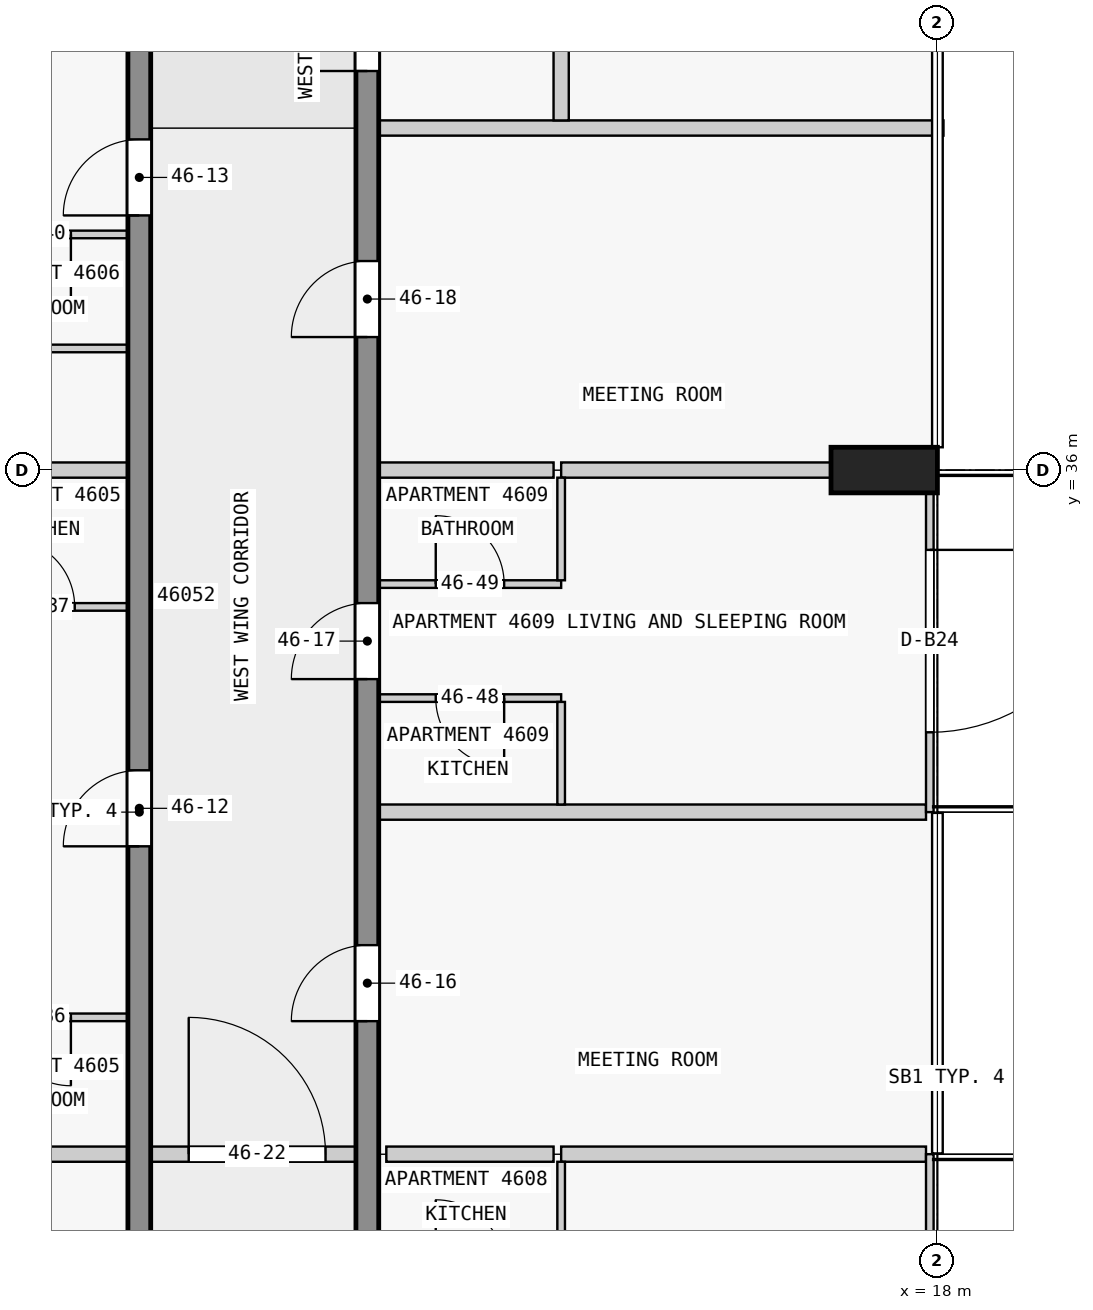
"""IFC4 building model, lengths in metres.
Left out: names, types, materials, properties, quantities, classifications, styles, units other than length and angle.
Written with IfcOpenShell. Run it as: python <this file> out.ifc"""

import sys

from ifc_helpers import new_model, si_unit, direction, frame, frame_2d, origin, origin_2d, place, context, subcontext, project, spatial, rectangle, extrude, element, fill, save


model = new_model("IFC4")
c1 = context("Model", 3, precision=1e-05, world=origin(), true_north=direction((0.0, 1.0)))
c2 = subcontext(c1, "Body", "Model", "MODEL_VIEW")
j1 = project(units=[si_unit("LENGTHUNIT", "METRE"), si_unit("PLANEANGLEUNIT", "RADIAN")], contexts=[c1])
p1 = place(None, origin())
s1 = spatial("IfcSite", under=j1, at=p1, CompositionType="ELEMENT")
p2 = place(p1, origin())
s2 = spatial("IfcBuilding", under=s1, at=p2, CompositionType="ELEMENT")
p3 = place(p2, frame((0.0, 0.0, 177.9)))
s3 = spatial("IfcBuildingStorey", under=s2, at=p3, CompositionType="ELEMENT", Elevation=177.9)
p4 = place(p3, frame((17.3, 36.0, 0.0), z_axis=(0.0, 0.0, 1.0), x_axis=(0.0, 1.0, 0.0)))
e1 = element("IfcColumn", 1, at=p4, inside=s3, PredefinedType="COLUMN", context=c2, shape_type="SweptSolid", body=[
    extrude(rectangle(XDim=0.6, YDim=1.4, at=origin_2d()), origin(), (0.0, 0.0, 1.0), 3.5),
])
p5 = place(p3, frame((7.5, 18.0, 0.0), z_axis=(0.0, 0.0, 1.0), x_axis=(0.0, 1.0, 0.0)))
e2 = element("IfcWall", 2, at=p5, inside=s3, PredefinedType="SHEAR", context=c2, shape_type="SweptSolid", body=[
    extrude(rectangle(XDim=27.0, YDim=0.3, at=frame_2d((13.5, 0.0))), origin(), (0.0, 0.0, 1.0), 3.25),
])
p6 = place(p5, frame((1.75, 0.0, 0.0)))
e3 = element("IfcOpeningElement", 3, at=p6, cuts=e2, PredefinedType="OPENING", context=c2, shape_type="SweptSolid", body=[
    extrude(rectangle(XDim=1.0, YDim=2.1, at=frame_2d((0.5, 1.05))), frame((0.0, 0.16, 0.0), z_axis=(0.0, -1.0, 0.0), x_axis=(1.0, 0.0, 0.0)), (0.0, 0.0, 1.0), 0.32),
])
p7 = place(p5, frame((5.85, 0.0, 0.0)))
e4 = element("IfcOpeningElement", 4, at=p7, cuts=e2, PredefinedType="OPENING", context=c2, shape_type="SweptSolid", body=[
    extrude(rectangle(XDim=1.8, YDim=2.1, at=frame_2d((0.9, 1.05))), frame((0.0, 0.16, 0.0), z_axis=(0.0, -1.0, 0.0), x_axis=(1.0, 0.0, 0.0)), (0.0, 0.0, 1.0), 0.32),
])
p8 = place(p5, frame((13.05, 0.0, 0.0)))
e5 = element("IfcOpeningElement", 5, at=p8, cuts=e2, PredefinedType="OPENING", context=c2, shape_type="SweptSolid", body=[
    extrude(rectangle(XDim=1.0, YDim=2.1, at=frame_2d((0.5, 1.05))), frame((0.0, 0.16, 0.0), z_axis=(0.0, -1.0, 0.0), x_axis=(1.0, 0.0, 0.0)), (0.0, 0.0, 1.0), 0.32),
])
p9 = place(p5, frame((21.35, 0.0, 0.0)))
e6 = element("IfcOpeningElement", 6, at=p9, cuts=e2, PredefinedType="OPENING", context=c2, shape_type="SweptSolid", body=[
    extrude(rectangle(XDim=1.0, YDim=2.1, at=frame_2d((0.5, 1.05))), frame((0.0, 0.16, 0.0), z_axis=(0.0, -1.0, 0.0), x_axis=(1.0, 0.0, 0.0)), (0.0, 0.0, 1.0), 0.32),
])
p10 = place(p3, frame((10.5, 18.0, 0.0), z_axis=(0.0, 0.0, 1.0), x_axis=(0.0, 1.0, 0.0)))
e7 = element("IfcWall", 7, at=p10, inside=s3, PredefinedType="SHEAR", context=c2, shape_type="SweptSolid", body=[
    extrude(rectangle(XDim=27.0, YDim=0.3, at=frame_2d((13.5, 0.0))), origin(), (0.0, 0.0, 1.0), 3.25),
])
p11 = place(p10, frame((1.75, 0.0, 0.0)))
e8 = element("IfcOpeningElement", 8, at=p11, cuts=e7, PredefinedType="OPENING", context=c2, shape_type="SweptSolid", body=[
    extrude(rectangle(XDim=1.0, YDim=2.1, at=frame_2d((0.5, 1.05))), frame((0.0, 0.16, 0.0), z_axis=(0.0, -1.0, 0.0), x_axis=(1.0, 0.0, 0.0)), (0.0, 0.0, 1.0), 0.32),
])
p12 = place(p10, frame((6.25, 0.0, 0.0)))
e9 = element("IfcOpeningElement", 9, at=p12, cuts=e7, PredefinedType="OPENING", context=c2, shape_type="SweptSolid", body=[
    extrude(rectangle(XDim=1.0, YDim=2.1, at=frame_2d((0.5, 1.05))), frame((0.0, 0.16, 0.0), z_axis=(0.0, -1.0, 0.0), x_axis=(1.0, 0.0, 0.0)), (0.0, 0.0, 1.0), 0.32),
])
p13 = place(p10, frame((10.75, 0.0, 0.0)))
e10 = element("IfcOpeningElement", 10, at=p13, cuts=e7, PredefinedType="OPENING", context=c2, shape_type="SweptSolid", body=[
    extrude(rectangle(XDim=1.0, YDim=2.1, at=frame_2d((0.5, 1.05))), frame((0.0, 0.16, 0.0), z_axis=(0.0, -1.0, 0.0), x_axis=(1.0, 0.0, 0.0)), (0.0, 0.0, 1.0), 0.32),
])
p14 = place(p10, frame((15.25, 0.0, 0.0)))
e11 = element("IfcOpeningElement", 11, at=p14, cuts=e7, PredefinedType="OPENING", context=c2, shape_type="SweptSolid", body=[
    extrude(rectangle(XDim=1.0, YDim=2.1, at=frame_2d((0.5, 1.05))), frame((0.0, 0.16, 0.0), z_axis=(0.0, -1.0, 0.0), x_axis=(1.0, 0.0, 0.0)), (0.0, 0.0, 1.0), 0.32),
])
p15 = place(p10, frame((19.75, 0.0, 0.0)))
e12 = element("IfcOpeningElement", 12, at=p15, cuts=e7, PredefinedType="OPENING", context=c2, shape_type="SweptSolid", body=[
    extrude(rectangle(XDim=1.0, YDim=2.1, at=frame_2d((0.5, 1.05))), frame((0.0, 0.16, 0.0), z_axis=(0.0, -1.0, 0.0), x_axis=(1.0, 0.0, 0.0)), (0.0, 0.0, 1.0), 0.32),
])
p16 = place(p10, frame((23.25, 0.0, 0.0)))
e13 = element("IfcOpeningElement", 13, at=p16, cuts=e7, PredefinedType="OPENING", context=c2, shape_type="SweptSolid", body=[
    extrude(rectangle(XDim=0.9, YDim=2.1, at=frame_2d((0.45, 1.05))), frame((0.0, 0.16, 0.0), z_axis=(0.0, -1.0, 0.0), x_axis=(1.0, 0.0, 0.0)), (0.0, 0.0, 1.0), 0.32),
])
p17 = place(p10, frame((25.45, 0.0, 0.0)))
e14 = element("IfcOpeningElement", 14, at=p17, cuts=e7, PredefinedType="OPENING", context=c2, shape_type="SweptSolid", body=[
    extrude(rectangle(XDim=1.0, YDim=2.1, at=frame_2d((0.5, 1.05))), frame((0.0, 0.16, 0.0), z_axis=(0.0, -1.0, 0.0), x_axis=(1.0, 0.0, 0.0)), (0.0, 0.0, 1.0), 0.32),
])
p18 = place(p3, frame((17.9, 27.0, 0.0), z_axis=(0.0, 0.0, 1.0), x_axis=(0.0, -1.0, 0.0)))
e15 = element("IfcWall", 15, at=p18, inside=s3, PredefinedType="STANDARD", context=c2, shape_type="SweptSolid", body=[
    extrude(rectangle(XDim=4.5, YDim=0.1, at=frame_2d((2.25, 0.0))), origin(), (0.0, 0.0, 1.0), 3.25),
])
p19 = place(p18, frame((1.05, 0.0, 0.0)))
e16 = element("IfcOpeningElement", 16, at=p19, cuts=e15, PredefinedType="OPENING", context=c2, shape_type="SweptSolid", body=[
    extrude(rectangle(XDim=2.4, YDim=2.4, at=frame_2d((1.2, 1.2))), frame((0.0, 0.06, 0.0), z_axis=(0.0, -1.0, 0.0), x_axis=(1.0, 0.0, 0.0)), (0.0, 0.0, 1.0), 0.12),
])
p20 = place(p3, frame((17.9, 36.0, 0.0), z_axis=(0.0, 0.0, 1.0), x_axis=(0.0, -1.0, 0.0)))
e17 = element("IfcWall", 17, at=p20, inside=s3, PredefinedType="STANDARD", context=c2, shape_type="SweptSolid", body=[
    extrude(rectangle(XDim=4.5, YDim=0.1, at=frame_2d((2.25, 0.0))), origin(), (0.0, 0.0, 1.0), 3.25),
])
p21 = place(p20, frame((1.05, 0.0, 0.0)))
e18 = element("IfcOpeningElement", 18, at=p21, cuts=e17, PredefinedType="OPENING", context=c2, shape_type="SweptSolid", body=[
    extrude(rectangle(XDim=2.4, YDim=2.4, at=frame_2d((1.2, 1.2))), frame((0.0, 0.06, 0.0), z_axis=(0.0, -1.0, 0.0), x_axis=(1.0, 0.0, 0.0)), (0.0, 0.0, 1.0), 0.12),
])
p22 = place(p3, frame((7.35, 27.0, 0.0), z_axis=(0.0, 0.0, 1.0), x_axis=(-1.0, 0.0, 0.0)))
e19 = element("IfcWall", 19, at=p22, inside=s3, PredefinedType="PARTITIONING", context=c2, shape_type="SweptSolid", body=[
    extrude(rectangle(XDim=7.43, YDim=0.2, at=frame_2d((3.715, 0.0))), origin(), (0.0, 0.0, 1.0), 3.25),
])
p23 = place(p3, frame((12.95, 27.0, 0.0), z_axis=(0.0, 0.0, 1.0), x_axis=(-1.0, 0.0, 0.0)))
e20 = element("IfcWall", 20, at=p23, inside=s3, PredefinedType="PARTITIONING", context=c2, shape_type="SweptSolid", body=[
    extrude(rectangle(XDim=2.2, YDim=0.2, at=frame_2d((1.1, 0.0))), origin(), (0.0, 0.0, 1.0), 3.25),
])
p24 = place(p3, frame((13.05, 27.0, 0.0), z_axis=(0.0, 0.0, 1.0), x_axis=(1.0, 0.0, 0.0)))
e21 = element("IfcWall", 21, at=p24, inside=s3, PredefinedType="PARTITIONING", context=c2, shape_type="SweptSolid", body=[
    extrude(rectangle(XDim=4.8, YDim=0.2, at=frame_2d((2.4, 0.0))), origin(), (0.0, 0.0, 1.0), 3.25),
])
p25 = place(p3, frame((7.35, 28.8, 0.0), z_axis=(0.0, 0.0, 1.0), x_axis=(-1.0, 0.0, 0.0)))
e22 = element("IfcWall", 22, at=p25, inside=s3, PredefinedType="PARTITIONING", context=c2, shape_type="SweptSolid", body=[
    extrude(rectangle(XDim=2.35, YDim=0.1, at=frame_2d((1.175, 0.0))), origin(), (0.0, 0.0, 1.0), 3.25),
])
p26 = place(p25, frame((0.75, 0.0, 0.0)))
e23 = element("IfcOpeningElement", 23, at=p26, cuts=e22, PredefinedType="OPENING", context=c2, shape_type="SweptSolid", body=[
    extrude(rectangle(XDim=0.9, YDim=2.1, at=frame_2d((0.45, 1.05))), frame((0.0, 0.06, 0.0), z_axis=(0.0, -1.0, 0.0), x_axis=(1.0, 0.0, 0.0)), (0.0, 0.0, 1.0), 0.12),
])
p27 = place(p3, frame((17.85, 31.5, 0.0), z_axis=(0.0, 0.0, 1.0), x_axis=(-1.0, 0.0, 0.0)))
e24 = element("IfcWall", 24, at=p27, inside=s3, PredefinedType="PARTITIONING", context=c2, shape_type="SweptSolid", body=[
    extrude(rectangle(XDim=7.2, YDim=0.2, at=frame_2d((3.6, 0.0))), origin(), (0.0, 0.0, 1.0), 3.25),
])
p28 = place(p3, frame((13.05, 33.0, 0.0), z_axis=(0.0, 0.0, 1.0), x_axis=(-1.0, 0.0, 0.0)))
e25 = element("IfcWall", 25, at=p28, inside=s3, PredefinedType="PARTITIONING", context=c2, shape_type="SweptSolid", body=[
    extrude(rectangle(XDim=2.4, YDim=0.1, at=frame_2d((1.2, 0.0))), origin(), (0.0, 0.0, 1.0), 3.25),
])
p29 = place(p28, frame((0.75, 0.0, 0.0)))
e26 = element("IfcOpeningElement", 26, at=p29, cuts=e25, PredefinedType="OPENING", context=c2, shape_type="SweptSolid", body=[
    extrude(rectangle(XDim=0.9, YDim=2.1, at=frame_2d((0.45, 1.05))), frame((0.0, 0.06, 0.0), z_axis=(0.0, -1.0, 0.0), x_axis=(1.0, 0.0, 0.0)), (0.0, 0.0, 1.0), 0.12),
])
p30 = place(p3, frame((5.0, 34.2, 0.0), z_axis=(0.0, 0.0, 1.0), x_axis=(1.0, 0.0, 0.0)))
e27 = element("IfcWall", 27, at=p30, inside=s3, PredefinedType="PARTITIONING", context=c2, shape_type="SweptSolid", body=[
    extrude(rectangle(XDim=2.35, YDim=0.1, at=frame_2d((1.175, 0.0))), origin(), (0.0, 0.0, 1.0), 3.25),
])
p31 = place(p30, frame((0.75, 0.0, 0.0)))
e28 = element("IfcOpeningElement", 28, at=p31, cuts=e27, PredefinedType="OPENING", context=c2, shape_type="SweptSolid", body=[
    extrude(rectangle(XDim=0.9, YDim=2.1, at=frame_2d((0.45, 1.05))), frame((0.0, 0.06, 0.0), z_axis=(0.0, -1.0, 0.0), x_axis=(1.0, 0.0, 0.0)), (0.0, 0.0, 1.0), 0.12),
])
p32 = place(p3, frame((10.65, 34.5, 0.0), z_axis=(0.0, 0.0, 1.0), x_axis=(1.0, 0.0, 0.0)))
e29 = element("IfcWall", 29, at=p32, inside=s3, PredefinedType="PARTITIONING", context=c2, shape_type="SweptSolid", body=[
    extrude(rectangle(XDim=2.4, YDim=0.1, at=frame_2d((1.2, 0.0))), origin(), (0.0, 0.0, 1.0), 3.25),
])
p33 = place(p32, frame((0.75, 0.0, 0.0)))
e30 = element("IfcOpeningElement", 30, at=p33, cuts=e29, PredefinedType="OPENING", context=c2, shape_type="SweptSolid", body=[
    extrude(rectangle(XDim=0.9, YDim=2.1, at=frame_2d((0.45, 1.05))), frame((0.0, 0.06, 0.0), z_axis=(0.0, -1.0, 0.0), x_axis=(1.0, 0.0, 0.0)), (0.0, 0.0, 1.0), 0.12),
])
for number, where, z_axis, x_axis in (
    (31, (7.35, 36.0, 0.0), (0.0, 0.0, 1.0), (-1.0, 0.0, 0.0)),
    (32, (12.95, 36.0, 0.0), (0.0, 0.0, 1.0), (-1.0, 0.0, 0.0)),
):
    element("IfcWall", number, at=place(p3, frame(where, z_axis=z_axis, x_axis=x_axis)), inside=s3, PredefinedType="PARTITIONING", context=c2, shape_type="SweptSolid", body=[
        extrude(rectangle(XDim=2.3, YDim=0.2, at=frame_2d((1.15, 0.0))), origin(), (0.0, 0.0, 1.0), 3.25),
    ])
p34 = place(p3, frame((13.05, 36.0, 0.0), z_axis=(0.0, 0.0, 1.0), x_axis=(1.0, 0.0, 0.0)))
e33 = element("IfcWall", 33, at=p34, inside=s3, PredefinedType="PARTITIONING", context=c2, shape_type="SweptSolid", body=[
    extrude(rectangle(XDim=3.55, YDim=0.2, at=frame_2d((1.775, 0.0))), origin(), (0.0, 0.0, 1.0), 3.25),
])
p35 = place(p3, frame((7.35, 37.6, 0.0), z_axis=(0.0, 0.0, 1.0), x_axis=(-1.0, 0.0, 0.0)))
e34 = element("IfcWall", 34, at=p35, inside=s3, PredefinedType="PARTITIONING", context=c2, shape_type="SweptSolid", body=[
    extrude(rectangle(XDim=2.35, YDim=0.1, at=frame_2d((1.175, 0.0))), origin(), (0.0, 0.0, 1.0), 3.25),
])
p36 = place(p3, frame((7.35, 39.1, 0.0), z_axis=(0.0, 0.0, 1.0), x_axis=(-1.0, 0.0, 0.0)))
e35 = element("IfcWall", 35, at=p36, inside=s3, PredefinedType="PARTITIONING", context=c2, shape_type="SweptSolid", body=[
    extrude(rectangle(XDim=2.35, YDim=0.1, at=frame_2d((1.175, 0.0))), origin(), (0.0, 0.0, 1.0), 3.25),
])
p37 = place(p36, frame((0.75, 0.0, 0.0)))
e36 = element("IfcOpeningElement", 36, at=p37, cuts=e35, PredefinedType="OPENING", context=c2, shape_type="SweptSolid", body=[
    extrude(rectangle(XDim=0.9, YDim=2.1, at=frame_2d((0.45, 1.05))), frame((0.0, 0.06, 0.0), z_axis=(0.0, -1.0, 0.0), x_axis=(1.0, 0.0, 0.0)), (0.0, 0.0, 1.0), 0.12),
])
p38 = place(p3, frame((18.08, 40.5, 0.0), z_axis=(0.0, 0.0, 1.0), x_axis=(-1.0, 0.0, 0.0)))
e37 = element("IfcWall", 37, at=p38, inside=s3, PredefinedType="PARTITIONING", context=c2, shape_type="SweptSolid", body=[
    extrude(rectangle(XDim=7.43, YDim=0.2, at=frame_2d((3.715, 0.0))), origin(), (0.0, 0.0, 1.0), 3.25),
])
for number, where, z_axis, x_axis in (
    (38, (13.05, 25.55, 0.0), (0.0, 0.0, 1.0), (0.0, 1.0, 0.0)),
    (39, (13.05, 31.6, 0.0), (0.0, 0.0, 1.0), (0.0, 1.0, 0.0)),
    (40, (13.05, 34.55, 0.0), (0.0, 0.0, 1.0), (0.0, 1.0, 0.0)),
):
    element("IfcWall", number, at=place(p3, frame(where, z_axis=z_axis, x_axis=x_axis)), inside=s3, PredefinedType="PARTITIONING", context=c2, shape_type="SweptSolid", body=[
        extrude(rectangle(XDim=1.35, YDim=0.1, at=frame_2d((0.675, 0.0))), origin(), (0.0, 0.0, 1.0), 3.25),
    ])
p39 = place(p3, frame((13.05, 40.6, 0.0), z_axis=(0.0, 0.0, 1.0), x_axis=(0.0, 1.0, 0.0)))
e41 = element("IfcWall", 41, at=p39, inside=s3, PredefinedType="PARTITIONING", context=c2, shape_type="SweptSolid", body=[
    extrude(rectangle(XDim=2.2, YDim=0.2, at=frame_2d((1.1, 0.0))), origin(), (0.0, 0.0, 1.0), 3.25),
])
p40 = place(p3, frame((7.45, 27.0, 0.0), z_axis=(0.0, 0.0, 1.0), x_axis=(1.0, 0.0, 0.0)))
e42 = element("IfcWall", 42, at=p40, inside=s3, PredefinedType="PARTITIONING", context=c2, shape_type="SweptSolid", body=[
    extrude(rectangle(XDim=3.2, YDim=0.2, at=frame_2d((1.6, 0.0))), origin(), (0.0, 0.0, 1.0), 3.25),
])
p41 = place(p40, frame((0.7, 0.0, 0.0)))
e43 = element("IfcOpeningElement", 43, at=p41, cuts=e42, PredefinedType="OPENING", context=c2, shape_type="SweptSolid", body=[
    extrude(rectangle(XDim=1.8, YDim=2.1, at=frame_2d((0.9, 1.05))), frame((0.0, 0.11, 0.0), z_axis=(0.0, -1.0, 0.0), x_axis=(1.0, 0.0, 0.0)), (0.0, 0.0, 1.0), 0.22),
])
p42 = place(p21, origin())
e44 = element("IfcDoor", 44, at=p42, inside=s3, OperationType="SINGLE_SWING_LEFT", PredefinedType="DOOR", context=c2, shape_type="SweptSolid", body=[
    extrude(rectangle(XDim=2.4, YDim=2.4, at=frame_2d((1.2, 1.2))), frame((0.0, 0.025, 0.0), z_axis=(0.0, -1.0, 0.0), x_axis=(1.0, 0.0, 0.0)), (0.0, 0.0, 1.0), 0.05),
])
fill(e18, e44)
p43 = place(p8, origin())
e45 = element("IfcDoor", 45, at=p43, inside=s3, OperationType="SINGLE_SWING_RIGHT", PredefinedType="DOOR", context=c2, shape_type="SweptSolid", body=[
    extrude(rectangle(XDim=1.0, YDim=2.1, at=frame_2d((0.5, 1.05))), frame((0.0, 0.025, 0.0), z_axis=(0.0, -1.0, 0.0), x_axis=(1.0, 0.0, 0.0)), (0.0, 0.0, 1.0), 0.05),
])
fill(e5, e45)
p44 = place(p9, origin())
e46 = element("IfcDoor", 46, at=p44, inside=s3, OperationType="SINGLE_SWING_RIGHT", PredefinedType="DOOR", context=c2, shape_type="SweptSolid", body=[
    extrude(rectangle(XDim=1.0, YDim=2.1, at=frame_2d((0.5, 1.05))), frame((0.0, 0.025, 0.0), z_axis=(0.0, -1.0, 0.0), x_axis=(1.0, 0.0, 0.0)), (0.0, 0.0, 1.0), 0.05),
])
fill(e6, e46)
p45 = place(p13, origin())
e47 = element("IfcDoor", 47, at=p45, inside=s3, OperationType="SINGLE_SWING_LEFT", PredefinedType="DOOR", context=c2, shape_type="SweptSolid", body=[
    extrude(rectangle(XDim=1.0, YDim=2.1, at=frame_2d((0.5, 1.05))), frame((0.0, 0.025, 0.0), z_axis=(0.0, -1.0, 0.0), x_axis=(1.0, 0.0, 0.0)), (0.0, 0.0, 1.0), 0.05),
])
fill(e10, e47)
p46 = place(p14, origin())
e48 = element("IfcDoor", 48, at=p46, inside=s3, OperationType="SINGLE_SWING_RIGHT", PredefinedType="DOOR", context=c2, shape_type="SweptSolid", body=[
    extrude(rectangle(XDim=1.0, YDim=2.1, at=frame_2d((0.5, 1.05))), frame((0.0, 0.025, 0.0), z_axis=(0.0, -1.0, 0.0), x_axis=(1.0, 0.0, 0.0)), (0.0, 0.0, 1.0), 0.05),
])
fill(e11, e48)
p47 = place(p15, origin())
e49 = element("IfcDoor", 49, at=p47, inside=s3, OperationType="SINGLE_SWING_RIGHT", PredefinedType="DOOR", context=c2, shape_type="SweptSolid", body=[
    extrude(rectangle(XDim=1.0, YDim=2.1, at=frame_2d((0.5, 1.05))), frame((0.0, 0.025, 0.0), z_axis=(0.0, -1.0, 0.0), x_axis=(1.0, 0.0, 0.0)), (0.0, 0.0, 1.0), 0.05),
])
fill(e12, e49)
p48 = place(p16, origin())
e50 = element("IfcDoor", 50, at=p48, inside=s3, OperationType="SINGLE_SWING_RIGHT", PredefinedType="DOOR", context=c2, shape_type="SweptSolid", body=[
    extrude(rectangle(XDim=0.9, YDim=2.1, at=frame_2d((0.45, 1.05))), frame((0.0, 0.025, 0.0), z_axis=(0.0, -1.0, 0.0), x_axis=(1.0, 0.0, 0.0)), (0.0, 0.0, 1.0), 0.05),
])
fill(e13, e50)
p49 = place(p41, origin())
e51 = element("IfcDoor", 51, at=p49, inside=s3, OperationType="SINGLE_SWING_LEFT", PredefinedType="DOOR", context=c2, shape_type="SweptSolid", body=[
    extrude(rectangle(XDim=1.8, YDim=2.1, at=frame_2d((0.9, 1.05))), frame((0.0, 0.025, 0.0), z_axis=(0.0, -1.0, 0.0), x_axis=(1.0, 0.0, 0.0)), (0.0, 0.0, 1.0), 0.05),
])
fill(e43, e51)
p50 = place(p26, origin())
e52 = element("IfcDoor", 52, at=p50, inside=s3, OperationType="SINGLE_SWING_RIGHT", PredefinedType="DOOR", context=c2, shape_type="SweptSolid", body=[
    extrude(rectangle(XDim=0.9, YDim=2.1, at=frame_2d((0.45, 1.05))), frame((0.0, 0.025, 0.0), z_axis=(0.0, -1.0, 0.0), x_axis=(1.0, 0.0, 0.0)), (0.0, 0.0, 1.0), 0.05),
])
fill(e23, e52)
p51 = place(p31, origin())
e53 = element("IfcDoor", 53, at=p51, inside=s3, OperationType="SINGLE_SWING_RIGHT", PredefinedType="DOOR", context=c2, shape_type="SweptSolid", body=[
    extrude(rectangle(XDim=0.9, YDim=2.1, at=frame_2d((0.45, 1.05))), frame((0.0, 0.025, 0.0), z_axis=(0.0, -1.0, 0.0), x_axis=(1.0, 0.0, 0.0)), (0.0, 0.0, 1.0), 0.05),
])
fill(e28, e53)
p52 = place(p37, origin())
e54 = element("IfcDoor", 54, at=p52, inside=s3, OperationType="SINGLE_SWING_RIGHT", PredefinedType="DOOR", context=c2, shape_type="SweptSolid", body=[
    extrude(rectangle(XDim=0.9, YDim=2.1, at=frame_2d((0.45, 1.05))), frame((0.0, 0.025, 0.0), z_axis=(0.0, -1.0, 0.0), x_axis=(1.0, 0.0, 0.0)), (0.0, 0.0, 1.0), 0.05),
])
fill(e36, e54)
p53 = place(p29, origin())
e55 = element("IfcDoor", 55, at=p53, inside=s3, OperationType="SINGLE_SWING_LEFT", PredefinedType="DOOR", context=c2, shape_type="SweptSolid", body=[
    extrude(rectangle(XDim=0.9, YDim=2.1, at=frame_2d((0.45, 1.05))), frame((0.0, 0.025, 0.0), z_axis=(0.0, -1.0, 0.0), x_axis=(1.0, 0.0, 0.0)), (0.0, 0.0, 1.0), 0.05),
])
fill(e26, e55)
p54 = place(p33, origin())
e56 = element("IfcDoor", 56, at=p54, inside=s3, OperationType="SINGLE_SWING_LEFT", PredefinedType="DOOR", context=c2, shape_type="SweptSolid", body=[
    extrude(rectangle(XDim=0.9, YDim=2.1, at=frame_2d((0.45, 1.05))), frame((0.0, 0.025, 0.0), z_axis=(0.0, -1.0, 0.0), x_axis=(1.0, 0.0, 0.0)), (0.0, 0.0, 1.0), 0.05),
])
fill(e30, e56)
save(model, sys.argv[1])
